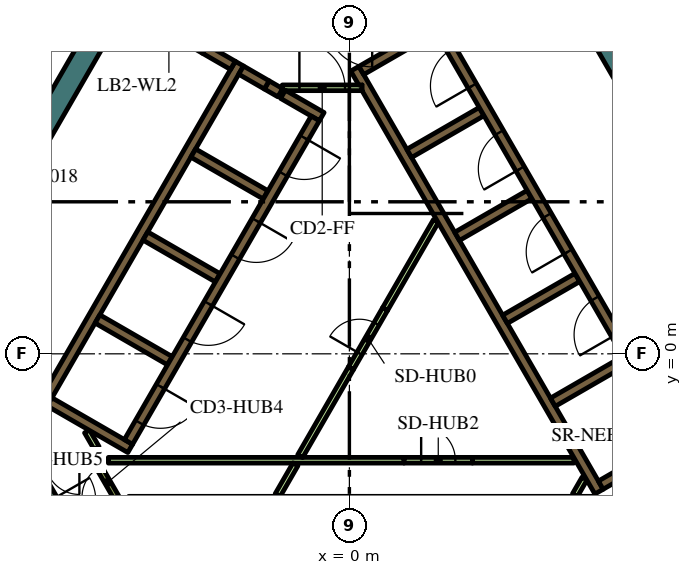
"""IFC4 building model, lengths in metres.
Left out: names, types, materials, properties, quantities, classifications, styles, units other than length and angle.
Written with IfcOpenShell. Run it as: python <this file> out.ifc"""

import sys

from ifc_helpers import new_model, si_unit, direction, frame, frame_2d, origin, place, context, subcontext, project, spatial, polyline, rectangle, outline, extrude, element, fill, save


model = new_model("IFC4")
c1 = context("Model", 3, precision=1e-05, world=origin(), true_north=direction((0.0, 1.0)))
c2 = subcontext(c1, "Body", "Model", "MODEL_VIEW")
j1 = project(units=[si_unit("LENGTHUNIT", "METRE"), si_unit("PLANEANGLEUNIT", "RADIAN")], contexts=[c1])
p1 = place(None, origin())
s1 = spatial("IfcSite", under=j1, at=p1, CompositionType="ELEMENT")
p2 = place(p1, origin())
s2 = spatial("IfcBuilding", under=s1, at=p2, CompositionType="ELEMENT")
p3 = place(p2, frame((0.0, 0.0, 283.8)))
s3 = spatial("IfcBuildingStorey", under=s2, at=p3, CompositionType="ELEMENT", Elevation=283.8)
p4 = place(p3, frame((1.989, 16.456, 0.0), z_axis=(0.0, 0.0, 1.0), x_axis=(0.49999102663, -0.8660305845, 0.0)))
e1 = element("IfcWall", 1, at=p4, inside=s3, PredefinedType="SOLIDWALL", context=c2, shape_type="SweptSolid", body=[
    extrude(rectangle(XDim=12.406, YDim=0.6, at=frame_2d((6.203, 0.0))), origin(), (0.0, 0.0, 1.0), 4.2),
])
p5 = place(p3, origin())
e2 = element("IfcWall", 2, at=p5, inside=s3, PredefinedType="SOLIDWALL", context=c2, shape_type="SweptSolid", body=[
    extrude(outline(polyline([(-15.502, -6.35), (-4.912, 11.992), (-4.393, 11.692), (-10.815, 0.569), (-10.84, 0.583), (-10.84, 0.583), (-10.84, 0.583), (-10.965, 0.367), (-10.965, 0.367), (-10.965, 0.367), (-10.94, 0.352), (-11.033, 0.191), (-14.809, -6.35), (-15.156, -6.95), (-15.502, -6.35)])), origin(), (0.0, 0.0, 1.0), 4.2),
])
e3 = element("IfcWall", 3, at=p5, inside=s3, PredefinedType="SOLIDWALL", context=c2, shape_type="SweptSolid", body=[
    extrude(outline(polyline([(0.332, 6.925), (0.335, 6.925), (0.335, 6.925), (0.335, 6.925), (0.335, 7.075), (0.335, 7.075), (0.335, 7.075), (0.245, 7.075), (0.035, 7.439), (0.252, 7.564), (0.377, 7.348), (1.512, 5.382), (1.637, 5.165), (2.221, 4.153), (2.771, 3.199), (2.896, 2.983), (3.138, 2.564), (4.031, 1.017), (4.156, 0.801), (5.292, -1.165), (5.417, -1.382), (6.073, -2.519), (6.552, -3.348), (6.677, -3.564), (6.46, -3.689), (0.332, 6.925)])), origin(), (0.0, 0.0, 1.0), 4.2),
])
p6 = place(p3, frame((3.1, 9.064, 0.0), z_axis=(0.0, 0.0, 1.0), x_axis=(-0.866030133475, -0.499991807846, 0.0)))
e4 = element("IfcWall", 4, at=p6, inside=s3, PredefinedType="SOLIDWALL", context=c2, shape_type="SweptSolid", body=[
    extrude(rectangle(XDim=3.217, YDim=0.25, at=frame_2d((1.608, 0.0))), origin(), (0.0, 0.0, 1.0), 4.2),
])
p7 = place(p3, frame((1.574, 5.274, 0.0), z_axis=(0.0, 0.0, 1.0), x_axis=(0.866028486751, 0.499994660107, 0.0)))
e5 = element("IfcWall", 5, at=p7, inside=s3, PredefinedType="SOLIDWALL", context=c2, shape_type="SweptSolid", body=[
    extrude(rectangle(XDim=2.2, YDim=0.25, at=frame_2d((1.1, 0.0))), origin(), (0.0, 0.0, 1.0), 4.2),
])
for number, where, z_axis, x_axis in (
    (6, (2.834, 3.091, 0.0), (0.0, 0.0, 1.0), (0.866, 0.5, 0.0)),
    (7, (4.094, 0.909, 0.0), (0.0, 0.0, 1.0), (0.866, 0.5, 0.0)),
    (8, (5.354, -1.274, 0.0), (0.0, 0.0, 1.0), (0.866, 0.5, 0.0)),
):
    element("IfcWall", number, at=place(p3, frame(where, z_axis=z_axis, x_axis=x_axis)), inside=s3, PredefinedType="SOLIDWALL", context=c2, shape_type="SweptSolid", body=[
        extrude(rectangle(XDim=2.2, YDim=0.25, at=frame_2d((1.1, 0.0))), origin(), (0.0, 0.0, 1.0), 4.2),
    ])
p8 = place(p3, frame((11.507, -0.631, 0.0), z_axis=(0.0, 0.0, 1.0), x_axis=(-0.866011447264, -0.500024172624, 0.0)))
e9 = element("IfcWall", 9, at=p8, inside=s3, PredefinedType="SOLIDWALL", context=c2, shape_type="SweptSolid", body=[
    extrude(rectangle(XDim=5.65, YDim=0.25, at=frame_2d((2.825, 0.0))), origin(), (0.0, 0.0, 1.0), 4.2),
])
p9 = place(p3, frame((-8.06, -1.311, 0.0), z_axis=(0.0, 0.0, 1.0), x_axis=(0.50000273126, 0.866023826885, 0.0)))
e10 = element("IfcWall", 10, at=p9, inside=s3, PredefinedType="SOLIDWALL", context=c2, shape_type="SweptSolid", body=[
    extrude(rectangle(XDim=10.33, YDim=0.25, at=frame_2d((5.165, 0.0))), origin(), (0.0, 0.0, 1.0), 4.2),
])
p10 = place(p3, frame((-1.819, 6.87, 0.0), z_axis=(0.0, 0.0, 1.0), x_axis=(-0.866294599386, 0.499533449405, 0.0)))
e11 = element("IfcWall", 11, at=p10, inside=s3, PredefinedType="SOLIDWALL", context=c2, shape_type="SweptSolid", body=[
    extrude(rectangle(XDim=0.41, YDim=0.25, at=frame_2d((0.205, 0.0))), origin(), (0.0, 0.0, 1.0), 4.2),
])
p11 = place(p3, frame((-2.849, 7.465, 0.0), z_axis=(0.0, 0.0, 1.0), x_axis=(0.865955664968, -0.500120771724, 0.0)))
e12 = element("IfcWall", 12, at=p11, inside=s3, PredefinedType="SOLIDWALL", context=c2, shape_type="SweptSolid", body=[
    extrude(rectangle(XDim=0.778, YDim=0.25, at=frame_2d((0.389, 0.0))), origin(), (0.0, 0.0, 1.0), 4.2),
])
p12 = place(p3, frame((-0.728, 6.24, 0.0), z_axis=(0.0, 0.0, 1.0), x_axis=(-0.866002680491, 0.500039355833, 0.0)))
e13 = element("IfcWall", 13, at=p12, inside=s3, PredefinedType="SOLIDWALL", context=c2, shape_type="SweptSolid", body=[
    extrude(rectangle(XDim=1.178, YDim=0.25, at=frame_2d((0.589, 0.0))), origin(), (0.0, 0.0, 1.0), 4.2),
])
for number, where, z_axis, x_axis in (
    (14, (-2.204, 4.182, 0.0), (0.0, 0.0, 1.0), (-0.866, 0.5, 0.0)),
    (15, (-5.369, 3.1, 0.0), (0.0, 0.0, 1.0), (0.866, -0.5, 0.0)),
    (16, (-4.724, -0.182, 0.0), (0.0, 0.0, 1.0), (-0.866, 0.5, 0.0)),
):
    element("IfcWall", number, at=place(p3, frame(where, z_axis=z_axis, x_axis=x_axis)), inside=s3, PredefinedType="SOLIDWALL", context=c2, shape_type="SweptSolid", body=[
        extrude(rectangle(XDim=2.2, YDim=0.25, at=frame_2d((1.1, 0.0))), origin(), (0.0, 0.0, 1.0), 4.2),
    ])
p13 = place(p3, frame((-7.889, -1.265, 0.0), z_axis=(0.0, 0.0, 1.0), x_axis=(0.866057815567, -0.499943856944, 0.0)))
e17 = element("IfcWall", 17, at=p13, inside=s3, PredefinedType="SOLIDWALL", context=c2, shape_type="SweptSolid", body=[
    extrude(rectangle(XDim=2.45, YDim=0.25, at=frame_2d((1.225, 0.0))), origin(), (0.0, 0.0, 1.0), 4.2),
])
p14 = place(p3, frame((-3.809, 8.019, 0.0), z_axis=(0.0, 0.0, 1.0), x_axis=(0.866010229787, -0.500026281214, 0.0)))
e18 = element("IfcWall", 18, at=p14, inside=s3, PredefinedType="SOLIDWALL", context=c2, shape_type="SweptSolid", body=[
    extrude(rectangle(XDim=0.858, YDim=0.25, at=frame_2d((0.429, 0.0))), origin(), (0.0, 0.0, 1.0), 4.2),
])
p15 = place(p3, frame((0.941, 1.179, 0.0), z_axis=(0.0, 0.0, 1.0), x_axis=(0.499962406319, 0.866047107418, 0.0)))
e19 = element("IfcWall", 19, at=p15, inside=s3, PredefinedType="PARTITIONING", context=c2, shape_type="SweptSolid", body=[
    extrude(rectangle(XDim=2.672, YDim=0.15, at=frame_2d((1.336, 0.0))), origin(), (0.0, 0.0, 1.0), 3.55),
])
p16 = place(p3, frame((1.438, -2.8, 0.0), z_axis=(0.0, 0.0, 1.0), x_axis=(-1.0, 0.0, 0.0)))
e20 = element("IfcWall", 20, at=p16, inside=s3, PredefinedType="PARTITIONING", context=c2, shape_type="SweptSolid", body=[
    extrude(rectangle(XDim=7.781, YDim=0.15, at=frame_2d((3.891, 0.0))), origin(), (0.0, 0.0, 1.0), 3.55),
])
p17 = place(p3, frame((-1.418, -2.907, 0.0), z_axis=(0.0, 0.0, 1.0), x_axis=(-0.499978056798, -0.866038072327, 0.0)))
e21 = element("IfcWall", 21, at=p17, inside=s3, PredefinedType="PARTITIONING", context=c2, shape_type="SweptSolid", body=[
    extrude(rectangle(XDim=0.937, YDim=0.15, at=frame_2d((0.469, 0.0))), origin(), (0.0, 0.0, 1.0), 3.55),
])
for number, where, z_axis, x_axis in (
    (22, (-1.295, -2.693, 0.0), (0.0, 0.0, 1.0), (0.5, 0.866, 0.0)),
    (23, (3.238, -2.8, 0.0), (0.0, 0.0, 1.0), (1.0, 0.0, 0.0)),
):
    element("IfcWall", number, at=place(p3, frame(where, z_axis=z_axis, x_axis=x_axis)), inside=s3, PredefinedType="PARTITIONING", context=c2, shape_type="SweptSolid", body=[
        extrude(rectangle(XDim=2.672, YDim=0.15, at=frame_2d((1.336, 0.0))), origin(), (0.0, 0.0, 1.0), 3.55),
    ])
p18 = place(p3, frame((-6.653, -2.477, 0.0), z_axis=(0.0, 0.0, 1.0), x_axis=(-0.500002592159, 0.866023907196, 0.0)))
e24 = element("IfcWall", 24, at=p18, inside=s3, PredefinedType="PARTITIONING", context=c2, shape_type="SweptSolid", body=[
    extrude(rectangle(XDim=0.503, YDim=0.15, at=frame_2d((0.251, 0.0))), origin(), (0.0, 0.0, 1.0), 3.55),
])
p19 = place(p3, frame((5.936, -3.718, 0.0), z_axis=(0.0, 0.0, 1.0), x_axis=(0.499890179513, 0.866088799389, 0.0)))
e25 = element("IfcWall", 25, at=p19, inside=s3, PredefinedType="PARTITIONING", context=c2, shape_type="SweptSolid", body=[
    extrude(rectangle(XDim=0.504, YDim=0.15, at=frame_2d((0.252, 0.0))), origin(), (0.0, 0.0, 1.0), 3.55),
])
p20 = place(p3, frame((8.565, -2.185, 0.0), z_axis=(0.0, 0.0, 1.0), x_axis=(-0.499997954832, 0.866026584559, 0.0)))
e26 = element("IfcWall", 26, at=p20, inside=s3, PredefinedType="SOLIDWALL", context=c2, shape_type="SweptSolid", body=[
    extrude(rectangle(XDim=12.35, YDim=0.25, at=frame_2d((6.175, 0.0))), origin(), (0.0, 0.0, 1.0), 4.2),
])
p21 = place(p20, frame((0.685, 0.0, 0.0)))
e27 = element("IfcOpeningElement", 27, at=p21, cuts=e26, PredefinedType="OPENING", context=c2, shape_type="SweptSolid", body=[
    extrude(rectangle(XDim=0.9, YDim=2.1, at=frame_2d((0.45, 1.05))), frame((0.0, 0.135, 0.0), z_axis=(0.0, -1.0, 0.0), x_axis=(1.0, 0.0, 0.0)), (0.0, 0.0, 1.0), 0.27),
])
p22 = place(p20, frame((3.105, 0.0, 0.0)))
e28 = element("IfcOpeningElement", 28, at=p22, cuts=e26, PredefinedType="OPENING", context=c2, shape_type="SweptSolid", body=[
    extrude(rectangle(XDim=1.1, YDim=2.1, at=frame_2d((0.55, 1.05))), frame((0.0, 0.135, 0.0), z_axis=(0.0, -1.0, 0.0), x_axis=(1.0, 0.0, 0.0)), (0.0, 0.0, 1.0), 0.27),
])
p23 = place(p20, frame((5.625, 0.0, 0.0)))
e29 = element("IfcOpeningElement", 29, at=p23, cuts=e26, PredefinedType="OPENING", context=c2, shape_type="SweptSolid", body=[
    extrude(rectangle(XDim=1.1, YDim=2.1, at=frame_2d((0.55, 1.05))), frame((0.0, 0.135, 0.0), z_axis=(0.0, -1.0, 0.0), x_axis=(1.0, 0.0, 0.0)), (0.0, 0.0, 1.0), 0.27),
])
p24 = place(p20, frame((8.145, 0.0, 0.0)))
e30 = element("IfcOpeningElement", 30, at=p24, cuts=e26, PredefinedType="OPENING", context=c2, shape_type="SweptSolid", body=[
    extrude(rectangle(XDim=1.1, YDim=2.1, at=frame_2d((0.55, 1.05))), frame((0.0, 0.135, 0.0), z_axis=(0.0, -1.0, 0.0), x_axis=(1.0, 0.0, 0.0)), (0.0, 0.0, 1.0), 0.27),
])
p25 = place(p20, frame((10.665, 0.0, 0.0)))
e31 = element("IfcOpeningElement", 31, at=p25, cuts=e26, PredefinedType="OPENING", context=c2, shape_type="SweptSolid", body=[
    extrude(rectangle(XDim=1.1, YDim=2.1, at=frame_2d((0.55, 1.05))), frame((0.0, 0.135, 0.0), z_axis=(0.0, -1.0, 0.0), x_axis=(1.0, 0.0, 0.0)), (0.0, 0.0, 1.0), 0.27),
])
p26 = place(p3, frame((-0.898, 6.194, 0.0), z_axis=(0.0, 0.0, 1.0), x_axis=(-0.499996202215, -0.866027596426, 0.0)))
e32 = element("IfcWall", 32, at=p26, inside=s3, PredefinedType="SOLIDWALL", context=c2, shape_type="SweptSolid", body=[
    extrude(rectangle(XDim=9.83, YDim=0.25, at=frame_2d((4.915, 0.0))), origin(), (0.0, 0.0, 1.0), 4.2),
])
p27 = place(p26, frame((0.585, 0.0, 0.0)))
e33 = element("IfcOpeningElement", 33, at=p27, cuts=e32, PredefinedType="OPENING", context=c2, shape_type="SweptSolid", body=[
    extrude(rectangle(XDim=1.1, YDim=2.1, at=frame_2d((0.55, 1.05))), frame((0.0, 0.135, 0.0), z_axis=(0.0, -1.0, 0.0), x_axis=(1.0, 0.0, 0.0)), (0.0, 0.0, 1.0), 0.27),
])
p28 = place(p26, frame((3.105, 0.0, 0.0)))
e34 = element("IfcOpeningElement", 34, at=p28, cuts=e32, PredefinedType="OPENING", context=c2, shape_type="SweptSolid", body=[
    extrude(rectangle(XDim=1.1, YDim=2.1, at=frame_2d((0.55, 1.05))), frame((0.0, 0.135, 0.0), z_axis=(0.0, -1.0, 0.0), x_axis=(1.0, 0.0, 0.0)), (0.0, 0.0, 1.0), 0.27),
])
p29 = place(p26, frame((5.625, 0.0, 0.0)))
e35 = element("IfcOpeningElement", 35, at=p29, cuts=e32, PredefinedType="OPENING", context=c2, shape_type="SweptSolid", body=[
    extrude(rectangle(XDim=1.1, YDim=2.1, at=frame_2d((0.55, 1.05))), frame((0.0, 0.135, 0.0), z_axis=(0.0, -1.0, 0.0), x_axis=(1.0, 0.0, 0.0)), (0.0, 0.0, 1.0), 0.27),
])
p30 = place(p26, frame((8.145, 0.0, 0.0)))
e36 = element("IfcOpeningElement", 36, at=p30, cuts=e32, PredefinedType="OPENING", context=c2, shape_type="SweptSolid", body=[
    extrude(rectangle(XDim=1.1, YDim=2.1, at=frame_2d((0.55, 1.05))), frame((0.0, 0.135, 0.0), z_axis=(0.0, -1.0, 0.0), x_axis=(1.0, 0.0, 0.0)), (0.0, 0.0, 1.0), 0.27),
])
p31 = place(p3, frame((7.048, -5.292, 0.0), z_axis=(0.0, 0.0, 1.0), x_axis=(0.49994051562, 0.866059744384, 0.0)))
e37 = element("IfcWall", 37, at=p31, inside=s3, PredefinedType="SOLIDWALL", context=c2, shape_type="SweptSolid", body=[
    extrude(rectangle(XDim=2.1, YDim=0.4, at=frame_2d((1.05, 0.0))), origin(), (0.0, 0.0, 1.0), 4.2),
])
p32 = place(p31, frame((0.45, 0.0, 0.0)))
e38 = element("IfcOpeningElement", 38, at=p32, cuts=e37, PredefinedType="OPENING", context=c2, shape_type="SweptSolid", body=[
    extrude(rectangle(XDim=1.2, YDim=2.1, at=frame_2d((0.6, 1.05))), frame((0.0, 0.21, 0.0), z_axis=(0.0, -1.0, 0.0), x_axis=(1.0, 0.0, 0.0)), (0.0, 0.0, 1.0), 0.42),
])
p33 = place(p3, frame((-8.098, -3.474, 0.0), z_axis=(0.0, 0.0, 1.0), x_axis=(0.49994051562, -0.866059744384, 0.0)))
e39 = element("IfcWall", 39, at=p33, inside=s3, PredefinedType="SOLIDWALL", context=c2, shape_type="SweptSolid", body=[
    extrude(rectangle(XDim=2.1, YDim=0.4, at=frame_2d((1.05, 0.0))), origin(), (0.0, 0.0, 1.0), 4.2),
])
p34 = place(p33, frame((0.45, 0.0, 0.0)))
e40 = element("IfcOpeningElement", 40, at=p34, cuts=e39, PredefinedType="OPENING", context=c2, shape_type="SweptSolid", body=[
    extrude(rectangle(XDim=1.2, YDim=2.1, at=frame_2d((0.6, 1.05))), frame((0.0, 0.21, 0.0), z_axis=(0.0, -1.0, 0.0), x_axis=(1.0, 0.0, 0.0)), (0.0, 0.0, 1.0), 0.42),
])
p35 = place(p3, frame((-1.765, 7.0, 0.0), z_axis=(0.0, 0.0, 1.0), x_axis=(1.0, 0.0, 0.0)))
e41 = element("IfcWall", 41, at=p35, inside=s3, PredefinedType="PARTITIONING", context=c2, shape_type="SweptSolid", body=[
    extrude(rectangle(XDim=2.1, YDim=0.15, at=frame_2d((1.05, 0.0))), origin(), (0.0, 0.0, 1.0), 3.55),
])
p36 = place(p35, frame((0.45, 0.0, 0.0)))
e42 = element("IfcOpeningElement", 42, at=p36, cuts=e41, PredefinedType="OPENING", context=c2, shape_type="SweptSolid", body=[
    extrude(rectangle(XDim=1.2, YDim=2.1, at=frame_2d((0.6, 1.05))), frame((0.0, 0.085, 0.0), z_axis=(0.0, -1.0, 0.0), x_axis=(1.0, 0.0, 0.0)), (0.0, 0.0, 1.0), 0.17),
])
p37 = place(p3, frame((-5.861, -4.248, 0.0), z_axis=(0.0, 0.0, 1.0), x_axis=(-0.500043646338, 0.866000203093, 0.0)))
e43 = element("IfcWall", 43, at=p37, inside=s3, PredefinedType="PARTITIONING", context=c2, shape_type="SweptSolid", body=[
    extrude(rectangle(XDim=1.93, YDim=0.15, at=frame_2d((0.965, 0.0))), origin(), (0.0, 0.0, 1.0), 4.2),
])
p38 = place(p37, frame((0.55, 0.0, 0.0)))
e44 = element("IfcOpeningElement", 44, at=p38, cuts=e43, PredefinedType="OPENING", context=c2, shape_type="SweptSolid", body=[
    extrude(rectangle(XDim=0.9, YDim=2.1, at=frame_2d((0.45, 1.05))), frame((0.0, 0.085, 0.0), z_axis=(0.0, -1.0, 0.0), x_axis=(1.0, 0.0, 0.0)), (0.0, 0.0, 1.0), 0.17),
])
p39 = place(p3, frame((-5.659, 9.012, 0.0), z_axis=(0.0, 0.0, 1.0), x_axis=(0.866009402589, -0.500027713859, 0.0)))
e45 = element("IfcWall", 45, at=p39, inside=s3, PredefinedType="PARTITIONING", context=c2, shape_type="SweptSolid", body=[
    extrude(rectangle(XDim=2.1, YDim=0.12, at=frame_2d((1.05, 0.0))), origin(), (0.0, 0.0, 1.0), 3.55),
])
p40 = place(p39, frame((0.45, 0.0, 0.0)))
e46 = element("IfcOpeningElement", 46, at=p40, cuts=e45, PredefinedType="OPENING", context=c2, shape_type="SweptSolid", body=[
    extrude(rectangle(XDim=1.2, YDim=2.1, at=frame_2d((0.6, 1.05))), frame((0.0, 0.07, 0.0), z_axis=(0.0, -1.0, 0.0), x_axis=(1.0, 0.0, 0.0)), (0.0, 0.0, 1.0), 0.14),
])
p41 = place(p3, frame((0.041, -0.379, 0.0), z_axis=(0.0, 0.0, 1.0), x_axis=(0.499961193289, 0.866047807691, 0.0)))
e47 = element("IfcWall", 47, at=p41, inside=s3, PredefinedType="PARTITIONING", context=c2, shape_type="SweptSolid", body=[
    extrude(rectangle(XDim=1.8, YDim=0.15, at=frame_2d((0.9, 0.0))), origin(), (0.0, 0.0, 1.0), 3.55),
])
p42 = place(p41, frame((0.45, 0.0, 0.0)))
e48 = element("IfcOpeningElement", 48, at=p42, cuts=e47, PredefinedType="OPENING", context=c2, shape_type="SweptSolid", body=[
    extrude(rectangle(XDim=0.9, YDim=2.1, at=frame_2d((0.45, 1.05))), frame((0.0, 0.085, 0.0), z_axis=(0.0, -1.0, 0.0), x_axis=(1.0, 0.0, 0.0)), (0.0, 0.0, 1.0), 0.17),
])
p43 = place(p3, frame((1.438, -2.8, 0.0), z_axis=(0.0, 0.0, 1.0), x_axis=(1.0, 0.0, 0.0)))
e49 = element("IfcWall", 49, at=p43, inside=s3, PredefinedType="PARTITIONING", context=c2, shape_type="SweptSolid", body=[
    extrude(rectangle(XDim=1.8, YDim=0.15, at=frame_2d((0.9, 0.0))), origin(), (0.0, 0.0, 1.0), 3.55),
])
p44 = place(p43, frame((0.45, 0.0, 0.0)))
e50 = element("IfcOpeningElement", 50, at=p44, cuts=e49, PredefinedType="OPENING", context=c2, shape_type="SweptSolid", body=[
    extrude(rectangle(XDim=0.9, YDim=2.1, at=frame_2d((0.45, 1.05))), frame((0.0, 0.085, 0.0), z_axis=(0.0, -1.0, 0.0), x_axis=(1.0, 0.0, 0.0)), (0.0, 0.0, 1.0), 0.17),
])
p45 = place(p3, frame((-6.655, -2.8, 0.0), z_axis=(0.0, 0.0, 1.0), x_axis=(-1.0, 0.0, 0.0)))
e51 = element("IfcWall", 51, at=p45, inside=s3, PredefinedType="PARTITIONING", context=c2, shape_type="SweptSolid", body=[
    extrude(rectangle(XDim=1.8, YDim=0.15, at=frame_2d((0.9, 0.0))), origin(), (0.0, 0.0, 1.0), 3.55),
])
p46 = place(p45, frame((0.45, 0.0, 0.0)))
e52 = element("IfcOpeningElement", 52, at=p46, cuts=e51, PredefinedType="OPENING", context=c2, shape_type="SweptSolid", body=[
    extrude(rectangle(XDim=0.9, YDim=2.1, at=frame_2d((0.45, 1.05))), frame((0.0, 0.085, 0.0), z_axis=(0.0, -1.0, 0.0), x_axis=(1.0, 0.0, 0.0)), (0.0, 0.0, 1.0), 0.17),
])
p47 = place(p3, frame((-7.436, 11.221, 0.0), z_axis=(0.0, 0.0, 1.0), x_axis=(-0.49999894854, -0.866026010844, 0.0)))
e53 = element("IfcWall", 53, at=p47, inside=s3, PredefinedType="PARTITIONING", context=c2, shape_type="SweptSolid", body=[
    extrude(rectangle(XDim=12.0, YDim=0.2, at=frame_2d((6.0, 0.0))), origin(), (0.0, 0.0, 1.0), 3.55),
])
p48 = place(p47, frame((5.5, 0.0, 0.0)))
e54 = element("IfcOpeningElement", 54, at=p48, cuts=e53, PredefinedType="OPENING", context=c2, shape_type="SweptSolid", body=[
    extrude(rectangle(XDim=1.0, YDim=2.1, at=frame_2d((0.5, 1.05))), frame((0.0, 0.11, 0.0), z_axis=(0.0, -1.0, 0.0), x_axis=(1.0, 0.0, 0.0)), (0.0, 0.0, 1.0), 0.22),
])
p49 = place(p22, origin())
e55 = element("IfcDoor", 55, at=p49, inside=s3, OperationType="DOUBLE_DOOR_SLIDING", PredefinedType="DOOR", context=c2, shape_type="SweptSolid", body=[
    extrude(rectangle(XDim=1.1, YDim=2.1, at=frame_2d((0.55, 1.05))), frame((0.0, 0.025, 0.0), z_axis=(0.0, -1.0, 0.0), x_axis=(1.0, 0.0, 0.0)), (0.0, 0.0, 1.0), 0.05),
])
fill(e28, e55)
p50 = place(p23, origin())
e56 = element("IfcDoor", 56, at=p50, inside=s3, OperationType="DOUBLE_DOOR_SLIDING", PredefinedType="DOOR", context=c2, shape_type="SweptSolid", body=[
    extrude(rectangle(XDim=1.1, YDim=2.1, at=frame_2d((0.55, 1.05))), frame((0.0, 0.025, 0.0), z_axis=(0.0, -1.0, 0.0), x_axis=(1.0, 0.0, 0.0)), (0.0, 0.0, 1.0), 0.05),
])
fill(e29, e56)
p51 = place(p24, origin())
e57 = element("IfcDoor", 57, at=p51, inside=s3, OperationType="DOUBLE_DOOR_SLIDING", PredefinedType="DOOR", context=c2, shape_type="SweptSolid", body=[
    extrude(rectangle(XDim=1.1, YDim=2.1, at=frame_2d((0.55, 1.05))), frame((0.0, 0.025, 0.0), z_axis=(0.0, -1.0, 0.0), x_axis=(1.0, 0.0, 0.0)), (0.0, 0.0, 1.0), 0.05),
])
fill(e30, e57)
p52 = place(p25, origin())
e58 = element("IfcDoor", 58, at=p52, inside=s3, OperationType="DOUBLE_DOOR_SLIDING", PredefinedType="DOOR", context=c2, shape_type="SweptSolid", body=[
    extrude(rectangle(XDim=1.1, YDim=2.1, at=frame_2d((0.55, 1.05))), frame((0.0, 0.025, 0.0), z_axis=(0.0, -1.0, 0.0), x_axis=(1.0, 0.0, 0.0)), (0.0, 0.0, 1.0), 0.05),
])
fill(e31, e58)
p53 = place(p27, origin())
e59 = element("IfcDoor", 59, at=p53, inside=s3, OperationType="DOUBLE_DOOR_SLIDING", PredefinedType="DOOR", context=c2, shape_type="SweptSolid", body=[
    extrude(rectangle(XDim=1.1, YDim=2.1, at=frame_2d((0.55, 1.05))), frame((0.0, 0.025, 0.0), z_axis=(0.0, -1.0, 0.0), x_axis=(1.0, 0.0, 0.0)), (0.0, 0.0, 1.0), 0.05),
])
fill(e33, e59)
p54 = place(p28, origin())
e60 = element("IfcDoor", 60, at=p54, inside=s3, OperationType="DOUBLE_DOOR_SLIDING", PredefinedType="DOOR", context=c2, shape_type="SweptSolid", body=[
    extrude(rectangle(XDim=1.1, YDim=2.1, at=frame_2d((0.55, 1.05))), frame((0.0, 0.025, 0.0), z_axis=(0.0, -1.0, 0.0), x_axis=(1.0, 0.0, 0.0)), (0.0, 0.0, 1.0), 0.05),
])
fill(e34, e60)
p55 = place(p29, origin())
e61 = element("IfcDoor", 61, at=p55, inside=s3, OperationType="DOUBLE_DOOR_SLIDING", PredefinedType="DOOR", context=c2, shape_type="SweptSolid", body=[
    extrude(rectangle(XDim=1.1, YDim=2.1, at=frame_2d((0.55, 1.05))), frame((0.0, 0.025, 0.0), z_axis=(0.0, -1.0, 0.0), x_axis=(1.0, 0.0, 0.0)), (0.0, 0.0, 1.0), 0.05),
])
fill(e35, e61)
p56 = place(p30, origin())
e62 = element("IfcDoor", 62, at=p56, inside=s3, OperationType="DOUBLE_DOOR_SLIDING", PredefinedType="DOOR", context=c2, shape_type="SweptSolid", body=[
    extrude(rectangle(XDim=1.1, YDim=2.1, at=frame_2d((0.55, 1.05))), frame((0.0, 0.025, 0.0), z_axis=(0.0, -1.0, 0.0), x_axis=(1.0, 0.0, 0.0)), (0.0, 0.0, 1.0), 0.05),
])
fill(e36, e62)
p57 = place(p36, origin())
e63 = element("IfcDoor", 63, at=p57, inside=s3, OperationType="SINGLE_SWING_LEFT", PredefinedType="DOOR", context=c2, shape_type="SweptSolid", body=[
    extrude(rectangle(XDim=1.2, YDim=2.1, at=frame_2d((0.6, 1.05))), frame((0.0, 0.025, 0.0), z_axis=(0.0, -1.0, 0.0), x_axis=(1.0, 0.0, 0.0)), (0.0, 0.0, 1.0), 0.05),
])
fill(e42, e63)
p58 = place(p38, origin())
e64 = element("IfcDoor", 64, at=p58, inside=s3, OperationType="SINGLE_SWING_LEFT", PredefinedType="DOOR", context=c2, shape_type="SweptSolid", body=[
    extrude(rectangle(XDim=0.9, YDim=2.1, at=frame_2d((0.45, 1.05))), frame((0.0, 0.025, 0.0), z_axis=(0.0, -1.0, 0.0), x_axis=(1.0, 0.0, 0.0)), (0.0, 0.0, 1.0), 0.05),
])
fill(e44, e64)
p59 = place(p42, origin())
e65 = element("IfcDoor", 65, at=p59, inside=s3, OperationType="SINGLE_SWING_LEFT", PredefinedType="DOOR", context=c2, shape_type="SweptSolid", body=[
    extrude(rectangle(XDim=0.9, YDim=2.1, at=frame_2d((0.45, 1.05))), frame((0.0, 0.025, 0.0), z_axis=(0.0, -1.0, 0.0), x_axis=(1.0, 0.0, 0.0)), (0.0, 0.0, 1.0), 0.05),
])
fill(e48, e65)
p60 = place(p44, origin())
e66 = element("IfcDoor", 66, at=p60, inside=s3, OperationType="SINGLE_SWING_LEFT", PredefinedType="DOOR", context=c2, shape_type="SweptSolid", body=[
    extrude(rectangle(XDim=0.9, YDim=2.1, at=frame_2d((0.45, 1.05))), frame((0.0, 0.025, 0.0), z_axis=(0.0, -1.0, 0.0), x_axis=(1.0, 0.0, 0.0)), (0.0, 0.0, 1.0), 0.05),
])
fill(e50, e66)
p61 = place(p46, origin())
e67 = element("IfcDoor", 67, at=p61, inside=s3, OperationType="SINGLE_SWING_LEFT", PredefinedType="DOOR", context=c2, shape_type="SweptSolid", body=[
    extrude(rectangle(XDim=0.9, YDim=2.1, at=frame_2d((0.45, 1.05))), frame((0.0, 0.025, 0.0), z_axis=(0.0, -1.0, 0.0), x_axis=(1.0, 0.0, 0.0)), (0.0, 0.0, 1.0), 0.05),
])
fill(e52, e67)
save(model, sys.argv[1])
